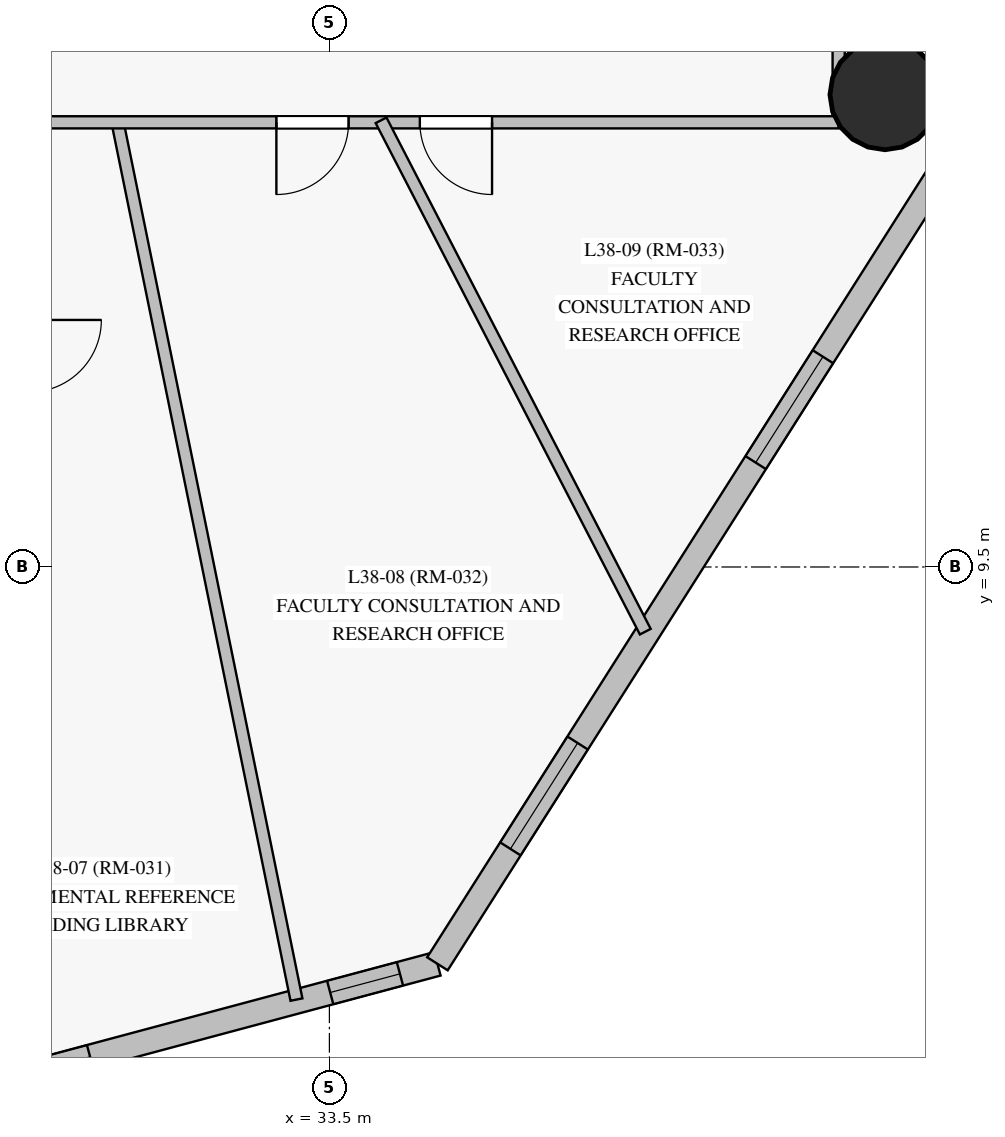
"""IFC4 building model, lengths in metres.
Left out: names, types, materials, properties, quantities, classifications, styles, units other than length and angle.
Written with IfcOpenShell. Run it as: python <this file> out.ifc"""

import sys

from ifc_helpers import new_model, si_unit, direction, frame, frame_2d, origin, origin_with_axes, origin_2d, place, context, subcontext, project, spatial, rectangle, circle, extrude, source, transform, mapped, element, fill, save


model = new_model("IFC4")
c1 = context("Model", 3, precision=1e-05, world=origin(), true_north=direction((0.0, 1.0)))
c2 = subcontext(c1, "Body", "Model", "MODEL_VIEW")
j1 = project(units=[si_unit("LENGTHUNIT", "METRE"), si_unit("PLANEANGLEUNIT", "RADIAN")], contexts=[c1])
p1 = place(None, origin())
s1 = spatial("IfcSite", under=j1, at=p1, CompositionType="ELEMENT")
p2 = place(p1, origin())
s2 = spatial("IfcBuilding", under=s1, at=p2, CompositionType="ELEMENT")
p3 = place(p2, frame((0.0, 0.0, 135.85)))
s3 = spatial("IfcBuildingStorey", under=s2, at=p3, CompositionType="ELEMENT", Elevation=135.85)
m1 = source(origin_with_axes(), c2, "Body", "SweptSolid", [
    extrude(circle(Radius=0.725, at=origin_2d()), origin(), (0.0, 0.0, 1.0), 3.05),
])
p4 = place(p3, frame((40.81, 15.714, 0.0), z_axis=(0.0, 0.0, 1.0), x_axis=(1.0, 0.0, 0.0)))
e1 = element("IfcColumn", 1, at=p4, inside=s3, PredefinedType="COLUMN", context=c2, shape_type="MappedRepresentation", body=[
    mapped(m1, transform((0.0, 0.0, 0.0), scale=1.0)),
])
p5 = place(p3, frame((25.846, 1.85, 0.0), z_axis=(0.0, 0.0, 1.0), x_axis=(0.965995584308, 0.258558564154, 0.0)))
e2 = element("IfcWall", 2, at=p5, inside=s3, PredefinedType="SOLIDWALL", context=c2, shape_type="SweptSolid", body=[
    extrude(rectangle(XDim=9.395, YDim=0.32, at=frame_2d((4.698, 0.0))), origin(), (0.0, 0.0, 1.0), 2.825),
])
p6 = place(p5, frame((3.015, 0.0, 0.85)))
e3 = element("IfcOpeningElement", 3, at=p6, cuts=e2, PredefinedType="OPENING", context=c2, shape_type="SweptSolid", body=[
    extrude(rectangle(XDim=1.65, YDim=1.65, at=frame_2d((0.825, 0.825))), frame((0.0, 0.17, 0.0), z_axis=(0.0, -1.0, 0.0), x_axis=(1.0, 0.0, 0.0)), (0.0, 0.0, 1.0), 0.34),
])
p7 = place(p5, frame((7.935, 0.0, 0.85)))
e4 = element("IfcOpeningElement", 4, at=p7, cuts=e2, PredefinedType="OPENING", context=c2, shape_type="SweptSolid", body=[
    extrude(rectangle(XDim=0.95, YDim=1.5, at=frame_2d((0.475, 0.75))), frame((0.0, 0.17, 0.0), z_axis=(0.0, -1.0, 0.0), x_axis=(1.0, 0.0, 0.0)), (0.0, 0.0, 1.0), 0.34),
])
p8 = place(p3, frame((34.921, 4.279, 0.0), z_axis=(0.0, 0.0, 1.0), x_axis=(0.536041661003, 0.84419152902, 0.0)))
e5 = element("IfcWall", 5, at=p8, inside=s3, PredefinedType="SOLIDWALL", context=c2, shape_type="SweptSolid", body=[
    extrude(rectangle(XDim=14.005, YDim=0.32, at=frame_2d((7.002, 0.0))), origin(), (0.0, 0.0, 1.0), 2.825),
])
p9 = place(p8, frame((1.791, 0.0, 0.85)))
e6 = element("IfcOpeningElement", 6, at=p9, cuts=e5, PredefinedType="OPENING", context=c2, shape_type="SweptSolid", body=[
    extrude(rectangle(XDim=1.65, YDim=1.65, at=frame_2d((0.825, 0.825))), frame((0.0, 0.17, 0.0), z_axis=(0.0, -1.0, 0.0), x_axis=(1.0, 0.0, 0.0)), (0.0, 0.0, 1.0), 0.34),
])
p10 = place(p8, frame((7.811, 0.0, 0.85)))
e7 = element("IfcOpeningElement", 7, at=p10, cuts=e5, PredefinedType="OPENING", context=c2, shape_type="SweptSolid", body=[
    extrude(rectangle(XDim=1.65, YDim=1.65, at=frame_2d((0.825, 0.825))), frame((0.0, 0.17, 0.0), z_axis=(0.0, -1.0, 0.0), x_axis=(1.0, 0.0, 0.0)), (0.0, 0.0, 1.0), 0.34),
])
p11 = place(p3, frame((40.2, 37.65, 0.0), z_axis=(0.0, 0.0, 1.0), x_axis=(0.0, -1.0, 0.0)))
e8 = element("IfcWall", 8, at=p11, inside=s3, PredefinedType="PARTITIONING", context=c2, shape_type="SweptSolid", body=[
    extrude(rectangle(XDim=22.3, YDim=0.16, at=frame_2d((11.15, 0.0))), origin(), (0.0, 0.0, 1.0), 2.325),
])
p12 = place(p11, frame((14.02, 0.0, 0.0)))
e9 = element("IfcOpeningElement", 9, at=p12, cuts=e8, PredefinedType="OPENING", context=c2, shape_type="SweptSolid", body=[
    extrude(rectangle(XDim=0.95, YDim=2.15, at=frame_2d((0.475, 1.075))), frame((0.0, 0.09, 0.0), z_axis=(0.0, -1.0, 0.0), x_axis=(1.0, 0.0, 0.0)), (0.0, 0.0, 1.0), 0.18),
])
p13 = place(p11, frame((10.675, 0.0, 0.0)))
e10 = element("IfcOpeningElement", 10, at=p13, cuts=e8, PredefinedType="OPENING", context=c2, shape_type="SweptSolid", body=[
    extrude(rectangle(XDim=0.95, YDim=2.15, at=frame_2d((0.475, 1.075))), frame((0.0, 0.09, 0.0), z_axis=(0.0, -1.0, 0.0), x_axis=(1.0, 0.0, 0.0)), (0.0, 0.0, 1.0), 0.18),
])
p14 = place(p11, frame((5.1, 0.0, 0.0)))
e11 = element("IfcOpeningElement", 11, at=p14, cuts=e8, PredefinedType="OPENING", context=c2, shape_type="SweptSolid", body=[
    extrude(rectangle(XDim=0.95, YDim=2.15, at=frame_2d((0.475, 1.075))), frame((0.0, 0.09, 0.0), z_axis=(0.0, -1.0, 0.0), x_axis=(1.0, 0.0, 0.0)), (0.0, 0.0, 1.0), 0.18),
])
p15 = place(p3, frame((30.707, 15.379, 0.0), z_axis=(0.0, 0.0, 1.0), x_axis=(0.199840113041, -0.979828520314, 0.0)))
e12 = element("IfcWall", 12, at=p15, inside=s3, PredefinedType="PARTITIONING", context=c2, shape_type="SweptSolid", body=[
    extrude(rectangle(XDim=11.809, YDim=0.16, at=frame_2d((5.904, 0.0))), origin(), (0.0, 0.0, 1.0), 2.825),
])
p16 = place(p3, frame((40.2, 15.35, 0.0), z_axis=(0.0, 0.0, 1.0), x_axis=(-1.0, 0.0, 0.0)))
e13 = element("IfcWall", 13, at=p16, inside=s3, PredefinedType="PARTITIONING", context=c2, shape_type="SweptSolid", body=[
    extrude(rectangle(XDim=10.65, YDim=0.16, at=frame_2d((5.325, 0.0))), origin(), (0.0, 0.0, 1.0), 2.225),
])
p17 = place(p16, frame((6.448, 0.0, 0.0)))
e14 = element("IfcOpeningElement", 14, at=p17, cuts=e13, PredefinedType="OPENING", context=c2, shape_type="SweptSolid", body=[
    extrude(rectangle(XDim=0.95, YDim=2.15, at=frame_2d((0.475, 1.075))), frame((0.0, 0.09, 0.0), z_axis=(0.0, -1.0, 0.0), x_axis=(1.0, 0.0, 0.0)), (0.0, 0.0, 1.0), 0.18),
])
p18 = place(p16, frame((4.56, 0.0, 0.0)))
e15 = element("IfcOpeningElement", 15, at=p18, cuts=e13, PredefinedType="OPENING", context=c2, shape_type="SweptSolid", body=[
    extrude(rectangle(XDim=0.95, YDim=2.15, at=frame_2d((0.475, 1.075))), frame((0.0, 0.09, 0.0), z_axis=(0.0, -1.0, 0.0), x_axis=(1.0, 0.0, 0.0)), (0.0, 0.0, 1.0), 0.18),
])
p19 = place(p3, frame((34.18, 15.377, 0.0), z_axis=(0.0, 0.0, 1.0), x_axis=(0.459051011209, -0.888409910519, 0.0)))
e16 = element("IfcWall", 16, at=p19, inside=s3, PredefinedType="PARTITIONING", context=c2, shape_type="SweptSolid", body=[
    extrude(rectangle(XDim=7.573, YDim=0.16, at=frame_2d((3.786, 0.0))), origin(), (0.0, 0.0, 1.0), 2.825),
])
m2 = source(origin_with_axes(), c2, "Body", "SweptSolid", [
    extrude(rectangle(XDim=1.65, YDim=1.65, at=frame_2d((0.825, 0.825))), frame((0.0, 0.03, 0.0), z_axis=(0.0, -1.0, 0.0), x_axis=(1.0, 0.0, 0.0)), (0.0, 0.0, 1.0), 0.06),
])
p20 = place(p6, origin())
e17 = element("IfcWindow", 17, at=p20, inside=s3, PartitioningType="SINGLE_PANEL", PredefinedType="WINDOW", context=c2, shape_type="MappedRepresentation", body=[
    mapped(m2, transform((0.0, 0.0, 0.0), scale=1.0)),
])
fill(e3, e17)
m3 = source(origin_with_axes(), c2, "Body", "SweptSolid", [
    extrude(rectangle(XDim=0.95, YDim=1.5, at=frame_2d((0.475, 0.75))), frame((0.0, 0.03, 0.0), z_axis=(0.0, -1.0, 0.0), x_axis=(1.0, 0.0, 0.0)), (0.0, 0.0, 1.0), 0.06),
])
p21 = place(p7, origin())
e18 = element("IfcWindow", 18, at=p21, inside=s3, PartitioningType="SINGLE_PANEL", PredefinedType="WINDOW", context=c2, shape_type="MappedRepresentation", body=[
    mapped(m3, transform((0.0, 0.0, 0.0), scale=1.0)),
])
fill(e4, e18)
p22 = place(p9, origin())
e19 = element("IfcWindow", 19, at=p22, inside=s3, PartitioningType="SINGLE_PANEL", PredefinedType="WINDOW", context=c2, shape_type="MappedRepresentation", body=[
    mapped(m2, transform((0.0, 0.0, 0.0), scale=1.0)),
])
fill(e6, e19)
p23 = place(p10, origin())
e20 = element("IfcWindow", 20, at=p23, inside=s3, PartitioningType="SINGLE_PANEL", PredefinedType="WINDOW", context=c2, shape_type="MappedRepresentation", body=[
    mapped(m2, transform((0.0, 0.0, 0.0), scale=1.0)),
])
fill(e7, e20)
m4 = source(origin_with_axes(), c2, "Body", "SweptSolid", [
    extrude(rectangle(XDim=0.95, YDim=2.15, at=frame_2d((0.475, 1.075))), frame((0.0, 0.025, 0.0), z_axis=(0.0, -1.0, 0.0), x_axis=(1.0, 0.0, 0.0)), (0.0, 0.0, 1.0), 0.05),
])
p24 = place(p17, origin())
e21 = element("IfcDoor", 21, at=p24, inside=s3, OperationType="SINGLE_SWING_RIGHT", PredefinedType="DOOR", context=c2, shape_type="MappedRepresentation", body=[
    mapped(m4, transform((0.0, 0.0, 0.0), scale=1.0)),
])
fill(e14, e21)
p25 = place(p18, origin())
e22 = element("IfcDoor", 22, at=p25, inside=s3, OperationType="SINGLE_SWING_LEFT", PredefinedType="DOOR", context=c2, shape_type="MappedRepresentation", body=[
    mapped(m4, transform((0.0, 0.0, 0.0), scale=1.0)),
])
fill(e15, e22)
save(model, sys.argv[1])
